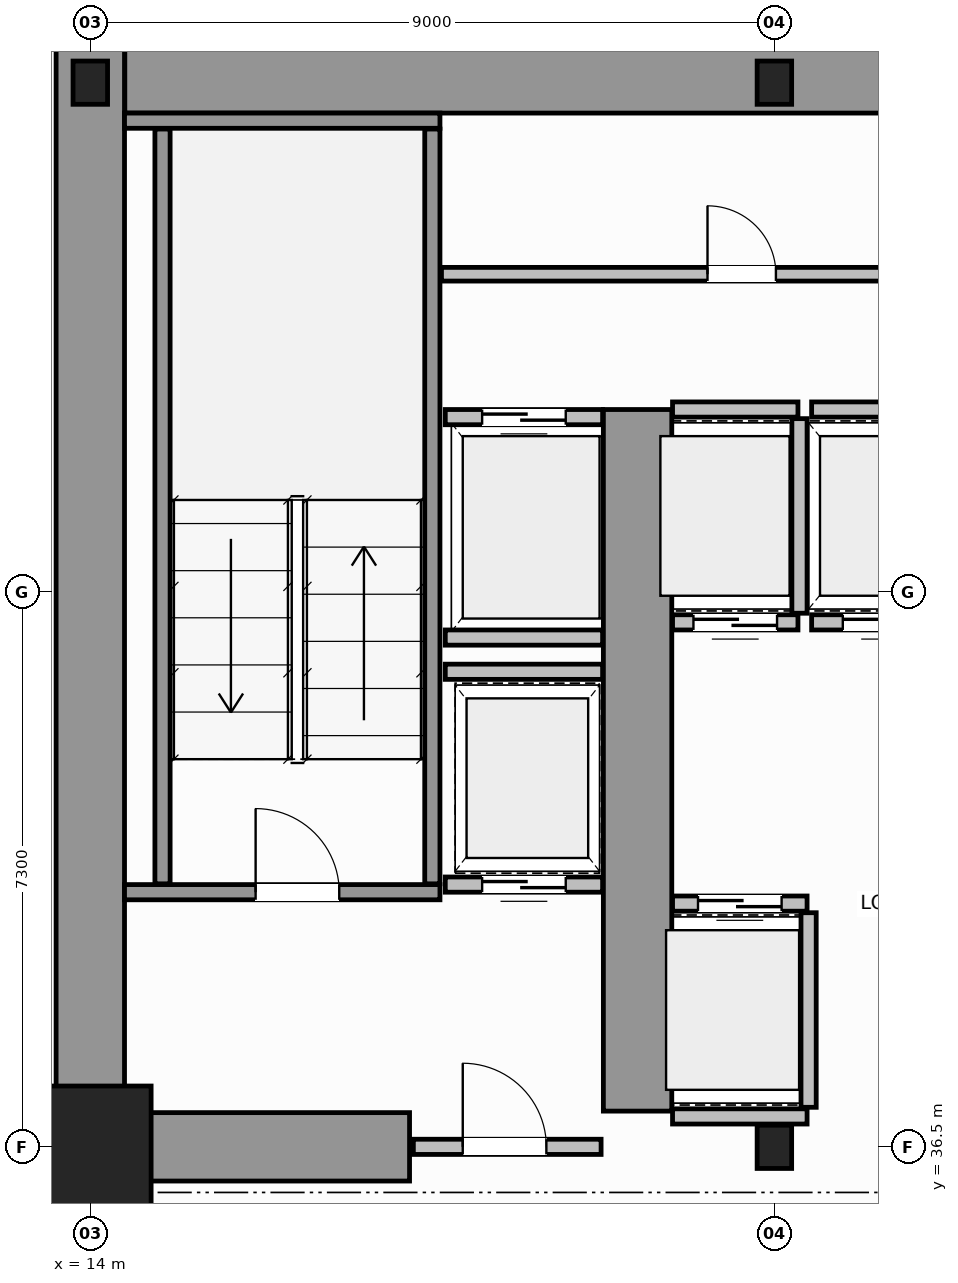
"""IFC4 building model, lengths in metres.
Left out: names, types, materials, properties, quantities, classifications, styles, units other than length and angle.
Written with IfcOpenShell. Run it as: python <this file> out.ifc"""

import sys

from ifc_helpers import new_model, si_unit, direction, frame, frame_2d, origin, origin_2d, place, context, subcontext, project, spatial, rectangle, i_section, extrude, source, transform, mapped, element, fill, save


model = new_model("IFC4")
c1 = context("Model", 3, precision=1e-05, world=origin(), true_north=direction((0.0, 1.0)))
c2 = subcontext(c1, "Body", "Model", "MODEL_VIEW")
j1 = project(units=[si_unit("LENGTHUNIT", "METRE"), si_unit("PLANEANGLEUNIT", "RADIAN")], contexts=[c1])
p1 = place(None, origin())
s1 = spatial("IfcSite", under=j1, at=p1, CompositionType="ELEMENT")
p2 = place(p1, origin())
s2 = spatial("IfcBuilding", under=s1, at=p2, CompositionType="ELEMENT")
p3 = place(p2, frame((0.0, 0.0, 26.4)))
s3 = spatial("IfcBuildingStorey", under=s2, at=p3, CompositionType="ELEMENT", Elevation=26.4)
m1 = source(origin(), c2, "Body", "SweptSolid", [
    extrude(rectangle(XDim=1.6, YDim=1.6, at=origin_2d()), origin(), (0.0, 0.0, 1.0), 3.8),
])
p4 = place(p3, frame((14.0, 36.5, 0.0), z_axis=(0.0, 0.0, 1.0), x_axis=(1.0, 0.0, 0.0)))
e1 = element("IfcColumn", 1, at=p4, inside=s3, PredefinedType="COLUMN", context=c2, shape_type="MappedRepresentation", body=[
    mapped(m1, transform((0.0, 0.0, 0.0), scale=1.0)),
])
m2 = source(origin(), c2, "Body", "SweptSolid", [
    extrude(i_section(OverallWidth=0.454, OverallDepth=0.569, WebThickness=0.078, FlangeThickness=0.08, FilletRadius=0.015, at=origin_2d()), origin(), (0.0, 0.0, 1.0), 3.8),
])
for number, where, z_axis, x_axis in (
    (2, (23.0, 36.5, 0.0), (0.0, 0.0, 1.0), (1.0, 0.0, 0.0)),
    (3, (14.0, 50.5, 0.0), (0.0, 0.0, 1.0), (1.0, 0.0, 0.0)),
    (4, (23.0, 50.5, 0.0), (0.0, 0.0, 1.0), (1.0, 0.0, 0.0)),
):
    element("IfcColumn", number, at=place(p3, frame(where, z_axis=z_axis, x_axis=x_axis)), inside=s3, PredefinedType="COLUMN", context=c2, shape_type="MappedRepresentation", body=[
        mapped(m2, transform((0.0, 0.0, 0.0), scale=1.0)),
    ])
p5 = place(p3, frame((14.454, 50.55, 0.0), z_axis=(0.0, 0.0, 1.0), x_axis=(1.0, 0.0, 0.0)))
e5 = element("IfcWall", 5, at=p5, inside=s3, PredefinedType="SHEAR", context=c2, shape_type="SweptSolid", body=[
    extrude(rectangle(XDim=19.544, YDim=0.9, at=frame_2d((9.772, 0.0))), origin(), (0.0, 0.0, 1.0), 3.8),
])
p6 = place(p3, frame((14.0, 36.5, 0.0), z_axis=(0.0, 0.0, 1.0), x_axis=(0.0, 1.0, 0.0)))
e6 = element("IfcWall", 6, at=p6, inside=s3, PredefinedType="SHEAR", context=c2, shape_type="SweptSolid", body=[
    extrude(rectangle(XDim=14.5, YDim=0.9, at=frame_2d((7.25, 0.0))), origin(), (0.0, 0.0, 1.0), 3.8),
])
p7 = place(p3, frame((14.47, 36.5, 0.0), z_axis=(0.0, 0.0, 1.0), x_axis=(1.0, 0.0, 0.0)))
e7 = element("IfcWall", 7, at=p7, inside=s3, PredefinedType="SHEAR", context=c2, shape_type="SweptSolid", body=[
    extrude(rectangle(XDim=3.73, YDim=0.9, at=frame_2d((1.865, 0.0))), origin(), (0.0, 0.0, 1.0), 2.38),
])
p8 = place(p3, frame((21.2, 36.97, 0.0), z_axis=(0.0, 0.0, 1.0), x_axis=(0.0, 1.0, 0.0)))
e8 = element("IfcWall", 8, at=p8, inside=s3, PredefinedType="SHEAR", context=c2, shape_type="SweptSolid", body=[
    extrude(rectangle(XDim=9.23, YDim=0.9, at=frame_2d((4.615, 0.0))), origin(), (0.0, 0.0, 1.0), 3.8),
])
p9 = place(p3, frame((14.45, 39.85, 0.0), z_axis=(0.0, 0.0, 1.0), x_axis=(1.0, 0.0, 0.0)))
e9 = element("IfcWall", 9, at=p9, inside=s3, PredefinedType="SOLIDWALL", context=c2, shape_type="SweptSolid", body=[
    extrude(rectangle(XDim=4.15, YDim=0.2, at=frame_2d((2.075, 0.0))), origin(), (0.0, 0.0, 1.0), 3.8),
])
p10 = place(p9, frame((1.725, 0.0, 0.0)))
e10 = element("IfcOpeningElement", 10, at=p10, cuts=e9, PredefinedType="OPENING", context=c2, shape_type="SweptSolid", body=[
    extrude(rectangle(XDim=1.1, YDim=2.15, at=frame_2d((0.55, 1.075))), frame((0.0, 0.11, 0.0), z_axis=(0.0, -1.0, 0.0), x_axis=(1.0, 0.0, 0.0)), (0.0, 0.0, 1.0), 0.22),
])
p11 = place(p3, frame((14.45, 50.0, 0.0), z_axis=(0.0, 0.0, 1.0), x_axis=(1.0, 0.0, 0.0)))
e11 = element("IfcWall", 11, at=p11, inside=s3, PredefinedType="SOLIDWALL", context=c2, shape_type="SweptSolid", body=[
    extrude(rectangle(XDim=4.15, YDim=0.2, at=frame_2d((2.075, 0.0))), origin(), (0.0, 0.0, 1.0), 3.8),
])
for number, where, z_axis, x_axis in (
    (12, (14.95, 39.96, 0.0), (0.0, 0.0, 1.0), (0.0, 1.0, 0.0)),
    (13, (18.5, 39.96, 0.0), (0.0, 0.0, 1.0), (0.0, 1.0, 0.0)),
):
    element("IfcWall", number, at=place(p3, frame(where, z_axis=z_axis, x_axis=x_axis)), inside=s3, PredefinedType="SOLIDWALL", context=c2, shape_type="SweptSolid", body=[
        extrude(rectangle(XDim=9.93, YDim=0.2, at=frame_2d((4.965, 0.0))), origin(), (0.0, 0.0, 1.0), 3.8),
    ])
p12 = place(p3, frame((18.25, 36.5, 0.0), z_axis=(0.0, 0.0, 1.0), x_axis=(1.0, 0.0, 0.0)))
e14 = element("IfcWall", 14, at=p12, inside=s3, PredefinedType="SOLIDWALL", context=c2, shape_type="SweptSolid", body=[
    extrude(rectangle(XDim=2.47, YDim=0.2, at=frame_2d((1.235, 0.0))), origin(), (0.0, 0.0, 1.0), 2.37),
])
p13 = place(p12, frame((0.65, 0.0, 0.0)))
e15 = element("IfcOpeningElement", 15, at=p13, cuts=e14, PredefinedType="OPENING", context=c2, shape_type="SweptSolid", body=[
    extrude(rectangle(XDim=1.1, YDim=2.15, at=frame_2d((0.55, 1.075))), frame((0.0, 0.11, 0.0), z_axis=(0.0, -1.0, 0.0), x_axis=(1.0, 0.0, 0.0)), (0.0, 0.0, 1.0), 0.22),
])
p14 = place(p3, frame((21.66, 39.7, 0.0), z_axis=(0.0, 0.0, 1.0), x_axis=(1.0, 0.0, 0.0)))
e16 = element("IfcWall", 16, at=p14, inside=s3, PredefinedType="SOLIDWALL", context=c2, shape_type="SweptSolid", body=[
    extrude(rectangle(XDim=1.77, YDim=0.2, at=frame_2d((0.885, 0.0))), origin(), (0.0, 0.0, 1.0), 3.58),
])
p15 = place(p14, frame((0.335, 0.0, 0.0)))
e17 = element("IfcOpeningElement", 17, at=p15, cuts=e16, PredefinedType="OPENING", context=c2, shape_type="SweptSolid", body=[
    extrude(rectangle(XDim=1.1, YDim=2.15, at=frame_2d((0.55, 1.075))), frame((0.0, 0.11, 0.0), z_axis=(0.0, -1.0, 0.0), x_axis=(1.0, 0.0, 0.0)), (0.0, 0.0, 1.0), 0.22),
])
p16 = place(p3, frame((21.66, 36.9, 0.0), z_axis=(0.0, 0.0, 1.0), x_axis=(1.0, 0.0, 0.0)))
e18 = element("IfcWall", 18, at=p16, inside=s3, PredefinedType="SOLIDWALL", context=c2, shape_type="SweptSolid", body=[
    extrude(rectangle(XDim=1.77, YDim=0.2, at=frame_2d((0.885, 0.0))), origin(), (0.0, 0.0, 1.0), 2.37),
])
p17 = place(p3, frame((23.45, 37.02, 0.0), z_axis=(0.0, 0.0, 1.0), x_axis=(0.0, 1.0, 0.0)))
e19 = element("IfcWall", 19, at=p17, inside=s3, PredefinedType="SOLIDWALL", context=c2, shape_type="SweptSolid", body=[
    extrude(rectangle(XDim=2.56, YDim=0.2, at=frame_2d((1.28, 0.0))), origin(), (0.0, 0.0, 1.0), 3.58),
])
p18 = place(p3, frame((21.66, 43.4, 0.0), z_axis=(0.0, 0.0, 1.0), x_axis=(1.0, 0.0, 0.0)))
e20 = element("IfcWall", 20, at=p18, inside=s3, PredefinedType="SOLIDWALL", context=c2, shape_type="SweptSolid", body=[
    extrude(rectangle(XDim=1.65, YDim=0.2, at=frame_2d((0.825, 0.0))), origin(), (0.0, 0.0, 1.0), 3.58),
])
p19 = place(p18, frame((0.275, 0.0, 0.0)))
e21 = element("IfcOpeningElement", 21, at=p19, cuts=e20, PredefinedType="OPENING", context=c2, shape_type="SweptSolid", body=[
    extrude(rectangle(XDim=1.1, YDim=2.15, at=frame_2d((0.55, 1.075))), frame((0.0, 0.11, 0.0), z_axis=(0.0, -1.0, 0.0), x_axis=(1.0, 0.0, 0.0)), (0.0, 0.0, 1.0), 0.22),
])
p20 = place(p3, frame((21.66, 46.2, 0.0), z_axis=(0.0, 0.0, 1.0), x_axis=(1.0, 0.0, 0.0)))
e22 = element("IfcWall", 22, at=p20, inside=s3, PredefinedType="SOLIDWALL", context=c2, shape_type="SweptSolid", body=[
    extrude(rectangle(XDim=1.65, YDim=0.2, at=frame_2d((0.825, 0.0))), origin(), (0.0, 0.0, 1.0), 3.58),
])
p21 = place(p3, frame((23.33, 43.52, 0.0), z_axis=(0.0, 0.0, 1.0), x_axis=(0.0, 1.0, 0.0)))
e23 = element("IfcWall", 23, at=p21, inside=s3, PredefinedType="SOLIDWALL", context=c2, shape_type="SweptSolid", body=[
    extrude(rectangle(XDim=2.56, YDim=0.2, at=frame_2d((1.28, 0.0))), origin(), (0.0, 0.0, 1.0), 3.58),
])
p22 = place(p3, frame((23.49, 43.4, 0.0), z_axis=(0.0, 0.0, 1.0), x_axis=(1.0, 0.0, 0.0)))
e24 = element("IfcWall", 24, at=p22, inside=s3, PredefinedType="SOLIDWALL", context=c2, shape_type="SweptSolid", body=[
    extrude(rectangle(XDim=1.92, YDim=0.2, at=frame_2d((0.96, 0.0))), origin(), (0.0, 0.0, 1.0), 3.58),
])
p23 = place(p22, frame((0.41, 0.0, 0.0)))
e25 = element("IfcOpeningElement", 25, at=p23, cuts=e24, PredefinedType="OPENING", context=c2, shape_type="SweptSolid", body=[
    extrude(rectangle(XDim=1.1, YDim=2.15, at=frame_2d((0.55, 1.075))), frame((0.0, 0.11, 0.0), z_axis=(0.0, -1.0, 0.0), x_axis=(1.0, 0.0, 0.0)), (0.0, 0.0, 1.0), 0.22),
])
p24 = place(p3, frame((23.49, 46.2, 0.0), z_axis=(0.0, 0.0, 1.0), x_axis=(1.0, 0.0, 0.0)))
e26 = element("IfcWall", 26, at=p24, inside=s3, PredefinedType="SOLIDWALL", context=c2, shape_type="SweptSolid", body=[
    extrude(rectangle(XDim=1.92, YDim=0.2, at=frame_2d((0.96, 0.0))), origin(), (0.0, 0.0, 1.0), 3.58),
])
p25 = place(p3, frame((18.67, 46.1, 0.0), z_axis=(0.0, 0.0, 1.0), x_axis=(1.0, 0.0, 0.0)))
e27 = element("IfcWall", 27, at=p25, inside=s3, PredefinedType="SOLIDWALL", context=c2, shape_type="SweptSolid", body=[
    extrude(rectangle(XDim=2.07, YDim=0.2, at=frame_2d((1.035, 0.0))), origin(), (0.0, 0.0, 1.0), 3.58),
])
p26 = place(p25, frame((0.485, 0.0, 0.0)))
e28 = element("IfcOpeningElement", 28, at=p26, cuts=e27, PredefinedType="OPENING", context=c2, shape_type="SweptSolid", body=[
    extrude(rectangle(XDim=1.1, YDim=2.15, at=frame_2d((0.55, 1.075))), frame((0.0, 0.11, 0.0), z_axis=(0.0, -1.0, 0.0), x_axis=(1.0, 0.0, 0.0)), (0.0, 0.0, 1.0), 0.22),
])
p27 = place(p3, frame((18.67, 43.2, 0.0), z_axis=(0.0, 0.0, 1.0), x_axis=(1.0, 0.0, 0.0)))
e29 = element("IfcWall", 29, at=p27, inside=s3, PredefinedType="SOLIDWALL", context=c2, shape_type="SweptSolid", body=[
    extrude(rectangle(XDim=2.07, YDim=0.2, at=frame_2d((1.035, 0.0))), origin(), (0.0, 0.0, 1.0), 3.58),
])
p28 = place(p3, frame((18.67, 39.95, 0.0), z_axis=(0.0, 0.0, 1.0), x_axis=(1.0, 0.0, 0.0)))
e30 = element("IfcWall", 30, at=p28, inside=s3, PredefinedType="SOLIDWALL", context=c2, shape_type="SweptSolid", body=[
    extrude(rectangle(XDim=2.07, YDim=0.2, at=frame_2d((1.035, 0.0))), origin(), (0.0, 0.0, 1.0), 3.58),
])
p29 = place(p28, frame((0.485, 0.0, 0.0)))
e31 = element("IfcOpeningElement", 31, at=p29, cuts=e30, PredefinedType="OPENING", context=c2, shape_type="SweptSolid", body=[
    extrude(rectangle(XDim=1.1, YDim=2.15, at=frame_2d((0.55, 1.075))), frame((0.0, 0.11, 0.0), z_axis=(0.0, -1.0, 0.0), x_axis=(1.0, 0.0, 0.0)), (0.0, 0.0, 1.0), 0.22),
])
p30 = place(p3, frame((18.67, 42.75, 0.0), z_axis=(0.0, 0.0, 1.0), x_axis=(1.0, 0.0, 0.0)))
e32 = element("IfcWall", 32, at=p30, inside=s3, PredefinedType="SOLIDWALL", context=c2, shape_type="SweptSolid", body=[
    extrude(rectangle(XDim=2.07, YDim=0.2, at=frame_2d((1.035, 0.0))), origin(), (0.0, 0.0, 1.0), 3.58),
])
p31 = place(p3, frame((18.62, 47.98, 0.0), z_axis=(0.0, 0.0, 1.0), x_axis=(1.0, 0.0, 0.0)))
e33 = element("IfcWall", 33, at=p31, inside=s3, PredefinedType="PLUMBINGWALL", context=c2, shape_type="SweptSolid", body=[
    extrude(rectangle(XDim=20.06, YDim=0.18, at=frame_2d((10.03, 0.0))), origin(), (0.0, 0.0, 1.0), 3.58),
])
p32 = place(p31, frame((3.5, 0.0, 0.0)))
e34 = element("IfcOpeningElement", 34, at=p32, cuts=e33, PredefinedType="OPENING", context=c2, shape_type="SweptSolid", body=[
    extrude(rectangle(XDim=0.9, YDim=2.15, at=frame_2d((0.45, 1.075))), frame((0.0, 0.1, 0.0), z_axis=(0.0, -1.0, 0.0), x_axis=(1.0, 0.0, 0.0)), (0.0, 0.0, 1.0), 0.2),
])
p33 = place(p31, frame((10.8, 0.0, 0.0)))
e35 = element("IfcOpeningElement", 35, at=p33, cuts=e33, PredefinedType="OPENING", context=c2, shape_type="SweptSolid", body=[
    extrude(rectangle(XDim=0.9, YDim=2.15, at=frame_2d((0.45, 1.075))), frame((0.0, 0.1, 0.0), z_axis=(0.0, -1.0, 0.0), x_axis=(1.0, 0.0, 0.0)), (0.0, 0.0, 1.0), 0.2),
])
p34 = place(p31, frame((16.8, 0.0, 0.0)))
e36 = element("IfcOpeningElement", 36, at=p34, cuts=e33, PredefinedType="OPENING", context=c2, shape_type="SweptSolid", body=[
    extrude(rectangle(XDim=0.9, YDim=2.15, at=frame_2d((0.45, 1.075))), frame((0.0, 0.1, 0.0), z_axis=(0.0, -1.0, 0.0), x_axis=(1.0, 0.0, 0.0)), (0.0, 0.0, 1.0), 0.2),
])
p35 = place(p3, frame((14.2, 34.16, 0.0), z_axis=(0.0, 0.0, 1.0), x_axis=(0.0, 1.0, 0.0)))
e37 = element("IfcWall", 37, at=p35, inside=s3, PredefinedType="PARTITIONING", context=c2, shape_type="SweptSolid", body=[
    extrude(rectangle(XDim=2.28, YDim=0.12, at=frame_2d((1.14, 0.0))), origin(), (0.0, 0.0, 1.0), 3.58),
])
p36 = place(p35, frame((0.3, 0.0, 0.0)))
e38 = element("IfcOpeningElement", 38, at=p36, cuts=e37, PredefinedType="OPENING", context=c2, shape_type="SweptSolid", body=[
    extrude(rectangle(XDim=0.9, YDim=2.15, at=frame_2d((0.45, 1.075))), frame((0.0, 0.07, 0.0), z_axis=(0.0, -1.0, 0.0), x_axis=(1.0, 0.0, 0.0)), (0.0, 0.0, 1.0), 0.14),
])
m3 = source(origin(), c2, "Body", "SweptSolid", [
    extrude(rectangle(XDim=1.1, YDim=2.15, at=frame_2d((0.55, 1.075))), frame((0.0, 0.025, 0.0), z_axis=(0.0, -1.0, 0.0), x_axis=(1.0, 0.0, 0.0)), (0.0, 0.0, 1.0), 0.05),
])
p37 = place(p10, origin())
e39 = element("IfcDoor", 39, at=p37, inside=s3, OperationType="SINGLE_SWING_LEFT", PredefinedType="DOOR", context=c2, shape_type="MappedRepresentation", body=[
    mapped(m3, transform((0.0, 0.0, 0.0), scale=1.0)),
])
fill(e10, e39)
p38 = place(p13, origin())
e40 = element("IfcDoor", 40, at=p38, inside=s3, OperationType="SINGLE_SWING_RIGHT", PredefinedType="DOOR", context=c2, shape_type="MappedRepresentation", body=[
    mapped(m3, transform((0.0, 0.0, 0.0), scale=1.0)),
])
fill(e15, e40)
p39 = place(p15, origin())
e41 = element("IfcDoor", 41, at=p39, inside=s3, OperationType="DOUBLE_DOOR_SLIDING", PredefinedType="DOOR", context=c2, shape_type="MappedRepresentation", body=[
    mapped(m3, transform((0.0, 0.0, 0.0), scale=1.0)),
])
fill(e17, e41)
p40 = place(p19, origin())
e42 = element("IfcDoor", 42, at=p40, inside=s3, OperationType="DOUBLE_DOOR_SLIDING", PredefinedType="DOOR", context=c2, shape_type="MappedRepresentation", body=[
    mapped(m3, transform((0.0, 0.0, 0.0), scale=1.0)),
])
fill(e21, e42)
p41 = place(p23, origin())
e43 = element("IfcDoor", 43, at=p41, inside=s3, OperationType="DOUBLE_DOOR_SLIDING", PredefinedType="DOOR", context=c2, shape_type="MappedRepresentation", body=[
    mapped(m3, transform((0.0, 0.0, 0.0), scale=1.0)),
])
fill(e25, e43)
p42 = place(p26, origin())
e44 = element("IfcDoor", 44, at=p42, inside=s3, OperationType="DOUBLE_DOOR_SLIDING", PredefinedType="DOOR", context=c2, shape_type="MappedRepresentation", body=[
    mapped(m3, transform((0.0, 0.0, 0.0), scale=1.0)),
])
fill(e28, e44)
p43 = place(p29, origin())
e45 = element("IfcDoor", 45, at=p43, inside=s3, OperationType="DOUBLE_DOOR_SLIDING", PredefinedType="DOOR", context=c2, shape_type="MappedRepresentation", body=[
    mapped(m3, transform((0.0, 0.0, 0.0), scale=1.0)),
])
fill(e31, e45)
m4 = source(origin(), c2, "Body", "SweptSolid", [
    extrude(rectangle(XDim=0.9, YDim=2.15, at=frame_2d((0.45, 1.075))), frame((0.0, 0.025, 0.0), z_axis=(0.0, -1.0, 0.0), x_axis=(1.0, 0.0, 0.0)), (0.0, 0.0, 1.0), 0.05),
])
p44 = place(p32, origin())
e46 = element("IfcDoor", 46, at=p44, inside=s3, OperationType="SINGLE_SWING_LEFT", PredefinedType="DOOR", context=c2, shape_type="MappedRepresentation", body=[
    mapped(m4, transform((0.0, 0.0, 0.0), scale=1.0)),
])
fill(e34, e46)
save(model, sys.argv[1])
